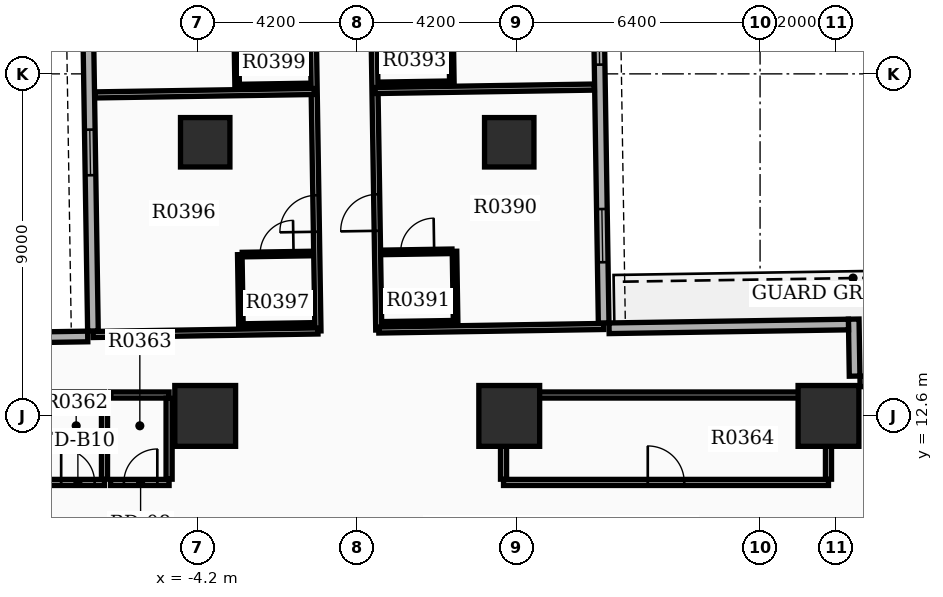
"""IFC4 building model, lengths in metres.
Left out: names, types, materials, properties, quantities, classifications, styles, units other than length and angle.
Written with IfcOpenShell. Run it as: python <this file> out.ifc"""

import sys

from ifc_helpers import new_model, si_unit, direction, frame, frame_2d, origin, origin_2d, place, context, subcontext, project, spatial, rectangle, extrude, element, fill, save


model = new_model("IFC4")
c1 = context("Model", 3, precision=1e-05, world=origin(), true_north=direction((0.0, 1.0)))
c2 = subcontext(c1, "Body", "Model", "MODEL_VIEW")
j1 = project(units=[si_unit("LENGTHUNIT", "METRE"), si_unit("PLANEANGLEUNIT", "RADIAN")], contexts=[c1])
p1 = place(None, origin())
s1 = spatial("IfcSite", under=j1, at=p1, CompositionType="ELEMENT")
p2 = place(p1, origin())
s2 = spatial("IfcBuilding", under=s1, at=p2, CompositionType="ELEMENT")
p3 = place(p2, frame((0.0, 0.0, 27.6)))
s3 = spatial("IfcBuildingStorey", under=s2, at=p3, CompositionType="ELEMENT", Elevation=27.6)
for number, where, z_axis, x_axis in (
    (1, (12.4, 12.6, 0.0), (0.0, 0.0, 1.0), (1.0, 0.0, 0.0)),
    (2, (4.0, 12.6, 0.0), (0.0, 0.0, 1.0), (1.0, 0.0, 0.0)),
    (3, (-4.0, 12.6, 0.0), (0.0, 0.0, 1.0), (1.0, 0.0, 0.0)),
):
    element("IfcColumn", number, at=place(p3, frame(where, z_axis=z_axis, x_axis=x_axis)), inside=s3, PredefinedType="COLUMN", context=c2, shape_type="SweptSolid", body=[
        extrude(rectangle(XDim=1.6, YDim=1.6, at=origin_2d()), origin(), (0.0, 0.0, 1.0), 3.9),
    ])
for number, where, z_axis, x_axis in (
    (4, (-4.0, 19.8, 0.0), (0.0, 0.0, 1.0), (1.0, 0.0, 0.0)),
    (5, (4.0, 19.8, 0.0), (0.0, 0.0, 1.0), (1.0, 0.0, 0.0)),
):
    element("IfcColumn", number, at=place(p3, frame(where, z_axis=z_axis, x_axis=x_axis)), inside=s3, PredefinedType="COLUMN", context=c2, shape_type="SweptSolid", body=[
        extrude(rectangle(XDim=1.3, YDim=1.3, at=origin_2d()), origin(), (0.0, 0.0, 1.0), 3.9),
    ])
p4 = place(p3, frame((6.485, 15.044, 0.0), z_axis=(0.0, 0.0, 1.0), x_axis=(-0.01571739401, 0.999876474133, 0.0)))
e6 = element("IfcWall", 6, at=p4, inside=s3, PredefinedType="STANDARD", context=c2, shape_type="SweptSolid", body=[
    extrude(rectangle(XDim=20.1, YDim=0.28, at=frame_2d((10.05, 0.0))), origin(), (0.0, 0.0, 1.0), 2.91),
])
p5 = place(p4, frame((1.6, 0.0, 0.8)))
e7 = element("IfcOpeningElement", 7, at=p5, cuts=e6, PredefinedType="OPENING", context=c2, shape_type="SweptSolid", body=[
    extrude(rectangle(XDim=1.4, YDim=1.6, at=frame_2d((0.7, 0.8))), frame((0.0, 0.15, 0.0), z_axis=(0.0, -1.0, 0.0), x_axis=(1.0, 0.0, 0.0)), (0.0, 0.0, 1.0), 0.3),
])
p6 = place(p4, frame((6.8, 0.0, 0.8)))
e8 = element("IfcOpeningElement", 8, at=p6, cuts=e6, PredefinedType="OPENING", context=c2, shape_type="SweptSolid", body=[
    extrude(rectangle(XDim=1.4, YDim=1.6, at=frame_2d((0.7, 0.8))), frame((0.0, 0.15, 0.0), z_axis=(0.0, -1.0, 0.0), x_axis=(1.0, 0.0, 0.0)), (0.0, 0.0, 1.0), 0.3),
])
p7 = place(p4, frame((10.0, 0.0, 0.8)))
e9 = element("IfcOpeningElement", 9, at=p7, cuts=e6, PredefinedType="OPENING", context=c2, shape_type="SweptSolid", body=[
    extrude(rectangle(XDim=1.4, YDim=1.6, at=frame_2d((0.7, 0.8))), frame((0.0, 0.15, 0.0), z_axis=(0.0, -1.0, 0.0), x_axis=(1.0, 0.0, 0.0)), (0.0, 0.0, 1.0), 0.3),
])
p8 = place(p4, frame((13.95, 0.0, 0.8)))
e10 = element("IfcOpeningElement", 10, at=p8, cuts=e6, PredefinedType="OPENING", context=c2, shape_type="SweptSolid", body=[
    extrude(rectangle(XDim=1.4, YDim=1.6, at=frame_2d((0.7, 0.8))), frame((0.0, 0.15, 0.0), z_axis=(0.0, -1.0, 0.0), x_axis=(1.0, 0.0, 0.0)), (0.0, 0.0, 1.0), 0.3),
])
p9 = place(p3, frame((-7.27, 34.93, 0.0), z_axis=(0.0, 0.0, 1.0), x_axis=(0.015705059908, -0.999876667941, 0.0)))
e11 = element("IfcWall", 11, at=p9, inside=s3, PredefinedType="STANDARD", context=c2, shape_type="SweptSolid", body=[
    extrude(rectangle(XDim=20.1, YDim=0.28, at=frame_2d((10.05, 0.0))), origin(), (0.0, 0.0, 1.0), 2.91),
])
p10 = place(p9, frame((1.6, 0.0, 0.8)))
e12 = element("IfcOpeningElement", 12, at=p10, cuts=e11, PredefinedType="OPENING", context=c2, shape_type="SweptSolid", body=[
    extrude(rectangle(XDim=1.4, YDim=1.6, at=frame_2d((0.7, 0.8))), frame((0.0, 0.15, 0.0), z_axis=(0.0, -1.0, 0.0), x_axis=(1.0, 0.0, 0.0)), (0.0, 0.0, 1.0), 0.3),
])
p11 = place(p9, frame((4.8, 0.0, 0.8)))
e13 = element("IfcOpeningElement", 13, at=p11, cuts=e11, PredefinedType="OPENING", context=c2, shape_type="SweptSolid", body=[
    extrude(rectangle(XDim=1.4, YDim=1.6, at=frame_2d((0.7, 0.8))), frame((0.0, 0.15, 0.0), z_axis=(0.0, -1.0, 0.0), x_axis=(1.0, 0.0, 0.0)), (0.0, 0.0, 1.0), 0.3),
])
p12 = place(p9, frame((8.0, 0.0, 0.8)))
e14 = element("IfcOpeningElement", 14, at=p12, cuts=e11, PredefinedType="OPENING", context=c2, shape_type="SweptSolid", body=[
    extrude(rectangle(XDim=1.4, YDim=1.6, at=frame_2d((0.7, 0.8))), frame((0.0, 0.15, 0.0), z_axis=(0.0, -1.0, 0.0), x_axis=(1.0, 0.0, 0.0)), (0.0, 0.0, 1.0), 0.3),
])
p13 = place(p9, frame((11.2, 0.0, 0.8)))
e15 = element("IfcOpeningElement", 15, at=p13, cuts=e11, PredefinedType="OPENING", context=c2, shape_type="SweptSolid", body=[
    extrude(rectangle(XDim=1.4, YDim=1.6, at=frame_2d((0.7, 0.8))), frame((0.0, 0.15, 0.0), z_axis=(0.0, -1.0, 0.0), x_axis=(1.0, 0.0, 0.0)), (0.0, 0.0, 1.0), 0.3),
])
p14 = place(p9, frame((14.799, 0.0, 0.85)))
e16 = element("IfcOpeningElement", 16, at=p14, cuts=e11, PredefinedType="OPENING", context=c2, shape_type="SweptSolid", body=[
    extrude(rectangle(XDim=1.2, YDim=1.6, at=frame_2d((0.6, 0.8))), frame((0.0, 0.15, 0.0), z_axis=(0.0, -1.0, 0.0), x_axis=(1.0, 0.0, 0.0)), (0.0, 0.0, 1.0), 0.3),
])
p15 = place(p3, frame((14.449, 13.529, 0.0), z_axis=(0.0, 0.0, 1.0), x_axis=(-0.999878147354, -0.015610587569, 0.0)))
e17 = element("IfcWall", 17, at=p15, inside=s3, PredefinedType="STANDARD", context=c2, shape_type="SweptSolid", body=[
    extrude(rectangle(XDim=1.22, YDim=0.28, at=frame_2d((0.61, 0.0))), origin(), (0.0, 0.0, 1.0), 2.91),
])
p16 = place(p3, frame((13.087, 13.647, 0.0), z_axis=(0.0, 0.0, 1.0), x_axis=(-0.015785793208, 0.999875396603, 0.0)))
e18 = element("IfcWall", 18, at=p16, inside=s3, PredefinedType="STANDARD", context=c2, shape_type="SweptSolid", body=[
    extrude(rectangle(XDim=1.5, YDim=0.28, at=frame_2d((0.75, 0.0))), origin(), (0.0, 0.0, 1.0), 2.91),
])
p17 = place(p3, frame((12.926, 15.005, 0.0), z_axis=(0.0, 0.0, 1.0), x_axis=(-0.999876823822, -0.015695132501, 0.0)))
e19 = element("IfcWall", 19, at=p17, inside=s3, PredefinedType="STANDARD", context=c2, shape_type="SweptSolid", body=[
    extrude(rectangle(XDim=6.3, YDim=0.28, at=frame_2d((3.15, 0.0))), origin(), (0.0, 0.0, 1.0), 2.91),
])
p18 = place(p3, frame((-13.391, 14.592, 0.0), z_axis=(0.0, 0.0, 1.0), x_axis=(0.999876833368, 0.015694524359, 0.0)))
e20 = element("IfcWall", 20, at=p18, inside=s3, PredefinedType="STANDARD", context=c2, shape_type="SweptSolid", body=[
    extrude(rectangle(XDim=6.3, YDim=0.28, at=frame_2d((3.15, 0.0))), origin(), (0.0, 0.0, 1.0), 2.91),
])
p19 = place(p3, frame((-8.14, 10.85, 0.0), z_axis=(0.0, 0.0, 1.0), x_axis=(1.0, 0.0, 0.0)))
e21 = element("IfcWall", 21, at=p19, inside=s3, PredefinedType="PARTITIONING", context=c2, shape_type="SweptSolid", body=[
    extrude(rectangle(XDim=1.49, YDim=0.16, at=frame_2d((0.745, 0.0))), origin(), (0.0, 0.0, 1.0), 2.9),
])
p20 = place(p19, frame((0.35, 0.0, 0.0)))
e22 = element("IfcOpeningElement", 22, at=p20, cuts=e21, PredefinedType="OPENING", context=c2, shape_type="SweptSolid", body=[
    extrude(rectangle(XDim=0.88, YDim=2.1, at=frame_2d((0.44, 1.05))), frame((0.0, 0.09, 0.0), z_axis=(0.0, -1.0, 0.0), x_axis=(1.0, 0.0, 0.0)), (0.0, 0.0, 1.0), 0.18),
])
p21 = place(p3, frame((-8.14, 13.15, 0.0), z_axis=(0.0, 0.0, 1.0), x_axis=(1.0, 0.0, 0.0)))
e23 = element("IfcWall", 23, at=p21, inside=s3, PredefinedType="PARTITIONING", context=c2, shape_type="SweptSolid", body=[
    extrude(rectangle(XDim=1.49, YDim=0.16, at=frame_2d((0.745, 0.0))), origin(), (0.0, 0.0, 1.0), 2.9),
])
p22 = place(p3, frame((-6.65, 10.935, 0.0), z_axis=(0.0, 0.0, 1.0), x_axis=(0.0, 1.0, 0.0)))
e24 = element("IfcWall", 24, at=p22, inside=s3, PredefinedType="PARTITIONING", context=c2, shape_type="SweptSolid", body=[
    extrude(rectangle(XDim=2.13, YDim=0.16, at=frame_2d((1.065, 0.0))), origin(), (0.0, 0.0, 1.0), 2.9),
])
p23 = place(p3, frame((-6.49, 10.85, 0.0), z_axis=(0.0, 0.0, 1.0), x_axis=(1.0, 0.0, 0.0)))
e25 = element("IfcWall", 25, at=p23, inside=s3, PredefinedType="PARTITIONING", context=c2, shape_type="SweptSolid", body=[
    extrude(rectangle(XDim=1.54, YDim=0.16, at=frame_2d((0.77, 0.0))), origin(), (0.0, 0.0, 1.0), 2.9),
])
p24 = place(p23, frame((0.35, 0.0, 0.0)))
e26 = element("IfcOpeningElement", 26, at=p24, cuts=e25, PredefinedType="OPENING", context=c2, shape_type="SweptSolid", body=[
    extrude(rectangle(XDim=0.88, YDim=2.15, at=frame_2d((0.44, 1.075))), frame((0.0, 0.09, 0.0), z_axis=(0.0, -1.0, 0.0), x_axis=(1.0, 0.0, 0.0)), (0.0, 0.0, 1.0), 0.18),
])
p25 = place(p3, frame((-6.49, 13.15, 0.0), z_axis=(0.0, 0.0, 1.0), x_axis=(1.0, 0.0, 0.0)))
e27 = element("IfcWall", 27, at=p25, inside=s3, PredefinedType="PARTITIONING", context=c2, shape_type="SweptSolid", body=[
    extrude(rectangle(XDim=1.54, YDim=0.16, at=frame_2d((0.77, 0.0))), origin(), (0.0, 0.0, 1.0), 2.9),
])
p26 = place(p3, frame((-4.95, 10.935, 0.0), z_axis=(0.0, 0.0, 1.0), x_axis=(0.0, 1.0, 0.0)))
e28 = element("IfcWall", 28, at=p26, inside=s3, PredefinedType="PARTITIONING", context=c2, shape_type="SweptSolid", body=[
    extrude(rectangle(XDim=2.13, YDim=0.16, at=frame_2d((1.065, 0.0))), origin(), (0.0, 0.0, 1.0), 2.9),
])
p27 = place(p3, frame((3.85, 10.85, 0.0), z_axis=(0.0, 0.0, 1.0), x_axis=(1.0, 0.0, 0.0)))
e29 = element("IfcWall", 29, at=p27, inside=s3, PredefinedType="PARTITIONING", context=c2, shape_type="SweptSolid", body=[
    extrude(rectangle(XDim=8.55, YDim=0.16, at=frame_2d((4.275, 0.0))), origin(), (0.0, 0.0, 1.0), 2.9),
])
p28 = place(p27, frame((3.795, 0.0, 0.0)))
e30 = element("IfcOpeningElement", 30, at=p28, cuts=e29, PredefinedType="OPENING", context=c2, shape_type="SweptSolid", body=[
    extrude(rectangle(XDim=0.96, YDim=2.15, at=frame_2d((0.48, 1.075))), frame((0.0, 0.09, 0.0), z_axis=(0.0, -1.0, 0.0), x_axis=(1.0, 0.0, 0.0)), (0.0, 0.0, 1.0), 0.18),
])
p29 = place(p3, frame((3.85, 13.15, 0.0), z_axis=(0.0, 0.0, 1.0), x_axis=(1.0, 0.0, 0.0)))
e31 = element("IfcWall", 31, at=p29, inside=s3, PredefinedType="PARTITIONING", context=c2, shape_type="SweptSolid", body=[
    extrude(rectangle(XDim=8.55, YDim=0.16, at=frame_2d((4.275, 0.0))), origin(), (0.0, 0.0, 1.0), 2.9),
])
for number, where, z_axis, x_axis in (
    (32, (3.85, 10.935, 0.0), (0.0, 0.0, 1.0), (0.0, 1.0, 0.0)),
    (33, (12.4, 10.935, 0.0), (0.0, 0.0, 1.0), (0.0, 1.0, 0.0)),
):
    element("IfcWall", number, at=place(p3, frame(where, z_axis=z_axis, x_axis=x_axis)), inside=s3, PredefinedType="PARTITIONING", context=c2, shape_type="SweptSolid", body=[
        extrude(rectangle(XDim=2.13, YDim=0.16, at=frame_2d((1.065, 0.0))), origin(), (0.0, 0.0, 1.0), 2.9),
    ])
p30 = place(p3, frame((0.567, 14.861, 0.0), z_axis=(0.0, 0.0, 1.0), x_axis=(-0.015713797103, 0.999876530668, 0.0)))
e34 = element("IfcWall", 34, at=p30, inside=s3, PredefinedType="PARTITIONING", context=c2, shape_type="SweptSolid", body=[
    extrude(rectangle(XDim=20.182, YDim=0.16, at=frame_2d((10.091, 0.0))), origin(), (0.0, 0.0, 1.0), 2.9),
])
p31 = place(p30, frame((2.61, 0.0, 0.0)))
e35 = element("IfcOpeningElement", 35, at=p31, cuts=e34, PredefinedType="OPENING", context=c2, shape_type="SweptSolid", body=[
    extrude(rectangle(XDim=0.96, YDim=2.15, at=frame_2d((0.48, 1.075))), frame((0.0, 0.09, 0.0), z_axis=(0.0, -1.0, 0.0), x_axis=(1.0, 0.0, 0.0)), (0.0, 0.0, 1.0), 0.18),
])
p32 = place(p30, frame((8.994, 0.0, 0.0)))
e36 = element("IfcOpeningElement", 36, at=p32, cuts=e34, PredefinedType="OPENING", context=c2, shape_type="SweptSolid", body=[
    extrude(rectangle(XDim=0.96, YDim=2.15, at=frame_2d((0.48, 1.075))), frame((0.0, 0.09, 0.0), z_axis=(0.0, -1.0, 0.0), x_axis=(1.0, 0.0, 0.0)), (0.0, 0.0, 1.0), 0.18),
])
p33 = place(p30, frame((18.93, 0.0, 0.0)))
e37 = element("IfcOpeningElement", 37, at=p33, cuts=e34, PredefinedType="OPENING", context=c2, shape_type="SweptSolid", body=[
    extrude(rectangle(XDim=0.96, YDim=2.15, at=frame_2d((0.48, 1.075))), frame((0.0, 0.09, 0.0), z_axis=(0.0, -1.0, 0.0), x_axis=(1.0, 0.0, 0.0)), (0.0, 0.0, 1.0), 0.18),
])
p34 = place(p3, frame((0.567, 14.861, 0.0), z_axis=(0.0, 0.0, 1.0), x_axis=(0.999876548847, 0.015712640343, 0.0)))
e38 = element("IfcWall", 38, at=p34, inside=s3, PredefinedType="PARTITIONING", context=c2, shape_type="SweptSolid", body=[
    extrude(rectangle(XDim=5.92, YDim=0.16, at=frame_2d((2.96, 0.0))), origin(), (0.0, 0.0, 1.0), 2.9),
])
p35 = place(p3, frame((0.468, 21.162, 0.0), z_axis=(0.0, 0.0, 1.0), x_axis=(0.999876865599, 0.015692470796, 0.0)))
e39 = element("IfcWall", 39, at=p35, inside=s3, PredefinedType="PARTITIONING", context=c2, shape_type="SweptSolid", body=[
    extrude(rectangle(XDim=5.772, YDim=0.16, at=frame_2d((2.886, 0.0))), origin(), (0.0, 0.0, 1.0), 2.9),
])
p36 = place(p3, frame((0.675, 16.903, 0.0), z_axis=(0.0, 0.0, 1.0), x_axis=(0.999874722342, 0.015828443418, 0.0)))
e40 = element("IfcWall", 40, at=p36, inside=s3, PredefinedType="PARTITIONING", context=c2, shape_type="SweptSolid", body=[
    extrude(rectangle(XDim=1.82, YDim=0.12, at=frame_2d((0.91, 0.0))), origin(), (0.0, 0.0, 1.0), 2.9),
])
p37 = place(p36, frame((0.47, 0.0, 0.0)))
e41 = element("IfcOpeningElement", 41, at=p37, cuts=e40, PredefinedType="OPENING", context=c2, shape_type="SweptSolid", body=[
    extrude(rectangle(XDim=0.88, YDim=2.1, at=frame_2d((0.44, 1.05))), frame((0.0, 0.07, 0.0), z_axis=(0.0, -1.0, 0.0), x_axis=(1.0, 0.0, 0.0)), (0.0, 0.0, 1.0), 0.14),
])
p38 = place(p3, frame((0.704, 15.023, 0.0), z_axis=(0.0, 0.0, 1.0), x_axis=(0.999876836305, 0.015694337248, 0.0)))
e42 = element("IfcWall", 42, at=p38, inside=s3, PredefinedType="PARTITIONING", context=c2, shape_type="SweptSolid", body=[
    extrude(rectangle(XDim=1.82, YDim=0.12, at=frame_2d((0.91, 0.0))), origin(), (0.0, 0.0, 1.0), 2.9),
])
p39 = place(p3, frame((2.589, 15.052, 0.0), z_axis=(0.0, 0.0, 1.0), x_axis=(-0.01571234584, 0.999876553475, 0.0)))
e43 = element("IfcWall", 43, at=p39, inside=s3, PredefinedType="PARTITIONING", context=c2, shape_type="SweptSolid", body=[
    extrude(rectangle(XDim=1.88, YDim=0.12, at=frame_2d((0.94, 0.0))), origin(), (0.0, 0.0, 1.0), 2.9),
])
p40 = place(p3, frame((0.605, 21.324, 0.0), z_axis=(0.0, 0.0, 1.0), x_axis=(0.999876836305, 0.015694337248, 0.0)))
e44 = element("IfcWall", 44, at=p40, inside=s3, PredefinedType="PARTITIONING", context=c2, shape_type="SweptSolid", body=[
    extrude(rectangle(XDim=1.82, YDim=0.12, at=frame_2d((0.91, 0.0))), origin(), (0.0, 0.0, 1.0), 2.9),
])
p41 = place(p3, frame((2.49, 21.354, 0.0), z_axis=(0.0, 0.0, 1.0), x_axis=(-0.015714386166, 0.99987652141, 0.0)))
e45 = element("IfcWall", 45, at=p41, inside=s3, PredefinedType="PARTITIONING", context=c2, shape_type="SweptSolid", body=[
    extrude(rectangle(XDim=1.88, YDim=0.12, at=frame_2d((0.94, 0.0))), origin(), (0.0, 0.0, 1.0), 2.9),
])
p42 = place(p3, frame((-1.033, 14.836, 0.0), z_axis=(0.0, 0.0, 1.0), x_axis=(-0.015701893165, 0.999876717676, 0.0)))
e46 = element("IfcWall", 46, at=p42, inside=s3, PredefinedType="PARTITIONING", context=c2, shape_type="SweptSolid", body=[
    extrude(rectangle(XDim=20.182, YDim=0.16, at=frame_2d((10.091, 0.0))), origin(), (0.0, 0.0, 1.0), 2.9),
])
p43 = place(p42, frame((2.61, 0.0, 0.0)))
e47 = element("IfcOpeningElement", 47, at=p43, cuts=e46, PredefinedType="OPENING", context=c2, shape_type="SweptSolid", body=[
    extrude(rectangle(XDim=0.96, YDim=2.15, at=frame_2d((0.48, 1.075))), frame((0.0, 0.09, 0.0), z_axis=(0.0, -1.0, 0.0), x_axis=(1.0, 0.0, 0.0)), (0.0, 0.0, 1.0), 0.18),
])
p44 = place(p42, frame((8.994, 0.0, 0.0)))
e48 = element("IfcOpeningElement", 48, at=p44, cuts=e46, PredefinedType="OPENING", context=c2, shape_type="SweptSolid", body=[
    extrude(rectangle(XDim=0.96, YDim=2.15, at=frame_2d((0.48, 1.075))), frame((0.0, 0.09, 0.0), z_axis=(0.0, -1.0, 0.0), x_axis=(1.0, 0.0, 0.0)), (0.0, 0.0, 1.0), 0.18),
])
p45 = place(p42, frame((18.93, 0.0, 0.0)))
e49 = element("IfcOpeningElement", 49, at=p45, cuts=e46, PredefinedType="OPENING", context=c2, shape_type="SweptSolid", body=[
    extrude(rectangle(XDim=0.96, YDim=2.15, at=frame_2d((0.48, 1.075))), frame((0.0, 0.09, 0.0), z_axis=(0.0, -1.0, 0.0), x_axis=(1.0, 0.0, 0.0)), (0.0, 0.0, 1.0), 0.18),
])
p46 = place(p3, frame((-1.033, 14.836, 0.0), z_axis=(0.0, 0.0, 1.0), x_axis=(-0.999876548847, -0.015712640343, 0.0)))
e50 = element("IfcWall", 50, at=p46, inside=s3, PredefinedType="PARTITIONING", context=c2, shape_type="SweptSolid", body=[
    extrude(rectangle(XDim=5.92, YDim=0.16, at=frame_2d((2.96, 0.0))), origin(), (0.0, 0.0, 1.0), 2.9),
])
p47 = place(p3, frame((-1.132, 21.137, 0.0), z_axis=(0.0, 0.0, 1.0), x_axis=(-0.999876865599, -0.015692470796, 0.0)))
e51 = element("IfcWall", 51, at=p47, inside=s3, PredefinedType="PARTITIONING", context=c2, shape_type="SweptSolid", body=[
    extrude(rectangle(XDim=5.772, YDim=0.16, at=frame_2d((2.886, 0.0))), origin(), (0.0, 0.0, 1.0), 2.9),
])
p48 = place(p3, frame((-3.025, 16.844, 0.0), z_axis=(0.0, 0.0, 1.0), x_axis=(0.999874722342, 0.015828443418, 0.0)))
e52 = element("IfcWall", 52, at=p48, inside=s3, PredefinedType="PARTITIONING", context=c2, shape_type="SweptSolid", body=[
    extrude(rectangle(XDim=1.82, YDim=0.12, at=frame_2d((0.91, 0.0))), origin(), (0.0, 0.0, 1.0), 2.9),
])
p49 = place(p48, frame((0.47, 0.0, 0.0)))
e53 = element("IfcOpeningElement", 53, at=p49, cuts=e52, PredefinedType="OPENING", context=c2, shape_type="SweptSolid", body=[
    extrude(rectangle(XDim=0.88, YDim=2.1, at=frame_2d((0.44, 1.05))), frame((0.0, 0.07, 0.0), z_axis=(0.0, -1.0, 0.0), x_axis=(1.0, 0.0, 0.0)), (0.0, 0.0, 1.0), 0.14),
])
p50 = place(p3, frame((-2.995, 14.965, 0.0), z_axis=(0.0, 0.0, 1.0), x_axis=(0.999876803258, 0.015696442504, 0.0)))
e54 = element("IfcWall", 54, at=p50, inside=s3, PredefinedType="PARTITIONING", context=c2, shape_type="SweptSolid", body=[
    extrude(rectangle(XDim=1.82, YDim=0.12, at=frame_2d((0.91, 0.0))), origin(), (0.0, 0.0, 1.0), 2.9),
])
p51 = place(p3, frame((-3.06, 14.964, 0.0), z_axis=(0.0, 0.0, 1.0), x_axis=(-0.015714386166, 0.99987652141, 0.0)))
e55 = element("IfcWall", 55, at=p51, inside=s3, PredefinedType="PARTITIONING", context=c2, shape_type="SweptSolid", body=[
    extrude(rectangle(XDim=1.88, YDim=0.12, at=frame_2d((0.94, 0.0))), origin(), (0.0, 0.0, 1.0), 2.9),
])
p52 = place(p3, frame((-3.094, 21.266, 0.0), z_axis=(0.0, 0.0, 1.0), x_axis=(0.999876836305, 0.015694337248, 0.0)))
e56 = element("IfcWall", 56, at=p52, inside=s3, PredefinedType="PARTITIONING", context=c2, shape_type="SweptSolid", body=[
    extrude(rectangle(XDim=1.82, YDim=0.12, at=frame_2d((0.91, 0.0))), origin(), (0.0, 0.0, 1.0), 2.9),
])
p53 = place(p3, frame((-3.159, 21.265, 0.0), z_axis=(0.0, 0.0, 1.0), x_axis=(-0.01571234584, 0.999876553475, 0.0)))
e57 = element("IfcWall", 57, at=p53, inside=s3, PredefinedType="PARTITIONING", context=c2, shape_type="SweptSolid", body=[
    extrude(rectangle(XDim=1.88, YDim=0.12, at=frame_2d((0.94, 0.0))), origin(), (0.0, 0.0, 1.0), 2.9),
])
p54 = place(p5, origin())
e58 = element("IfcWindow", 58, at=p54, inside=s3, PartitioningType="SINGLE_PANEL", PredefinedType="WINDOW", context=c2, shape_type="SweptSolid", body=[
    extrude(rectangle(XDim=1.4, YDim=1.6, at=frame_2d((0.7, 0.8))), frame((0.0, 0.03, 0.0), z_axis=(0.0, -1.0, 0.0), x_axis=(1.0, 0.0, 0.0)), (0.0, 0.0, 1.0), 0.06),
])
fill(e7, e58)
p55 = place(p6, origin())
e59 = element("IfcWindow", 59, at=p55, inside=s3, PartitioningType="SINGLE_PANEL", PredefinedType="WINDOW", context=c2, shape_type="SweptSolid", body=[
    extrude(rectangle(XDim=1.4, YDim=1.6, at=frame_2d((0.7, 0.8))), frame((0.0, 0.03, 0.0), z_axis=(0.0, -1.0, 0.0), x_axis=(1.0, 0.0, 0.0)), (0.0, 0.0, 1.0), 0.06),
])
fill(e8, e59)
p56 = place(p14, origin())
e60 = element("IfcWindow", 60, at=p56, inside=s3, PartitioningType="SINGLE_PANEL", PredefinedType="WINDOW", context=c2, shape_type="SweptSolid", body=[
    extrude(rectangle(XDim=1.2, YDim=1.6, at=frame_2d((0.6, 0.8))), frame((0.0, 0.03, 0.0), z_axis=(0.0, -1.0, 0.0), x_axis=(1.0, 0.0, 0.0)), (0.0, 0.0, 1.0), 0.06),
])
fill(e16, e60)
p57 = place(p20, origin())
e61 = element("IfcDoor", 61, at=p57, inside=s3, OperationType="SINGLE_SWING_LEFT", PredefinedType="DOOR", context=c2, shape_type="SweptSolid", body=[
    extrude(rectangle(XDim=0.88, YDim=2.1, at=frame_2d((0.44, 1.05))), frame((0.0, 0.025, 0.0), z_axis=(0.0, -1.0, 0.0), x_axis=(1.0, 0.0, 0.0)), (0.0, 0.0, 1.0), 0.05),
])
fill(e22, e61)
p58 = place(p24, origin())
e62 = element("IfcDoor", 62, at=p58, inside=s3, OperationType="SINGLE_SWING_RIGHT", PredefinedType="DOOR", context=c2, shape_type="SweptSolid", body=[
    extrude(rectangle(XDim=0.88, YDim=2.15, at=frame_2d((0.44, 1.075))), frame((0.0, 0.025, 0.0), z_axis=(0.0, -1.0, 0.0), x_axis=(1.0, 0.0, 0.0)), (0.0, 0.0, 1.0), 0.05),
])
fill(e26, e62)
p59 = place(p28, origin())
e63 = element("IfcDoor", 63, at=p59, inside=s3, OperationType="SINGLE_SWING_LEFT", PredefinedType="DOOR", context=c2, shape_type="SweptSolid", body=[
    extrude(rectangle(XDim=0.96, YDim=2.15, at=frame_2d((0.48, 1.075))), frame((0.0, 0.025, 0.0), z_axis=(0.0, -1.0, 0.0), x_axis=(1.0, 0.0, 0.0)), (0.0, 0.0, 1.0), 0.05),
])
fill(e30, e63)
p60 = place(p31, origin())
e64 = element("IfcDoor", 64, at=p60, inside=s3, OperationType="SINGLE_SWING_LEFT", PredefinedType="DOOR", context=c2, shape_type="SweptSolid", body=[
    extrude(rectangle(XDim=0.96, YDim=2.15, at=frame_2d((0.48, 1.075))), frame((0.0, 0.025, 0.0), z_axis=(0.0, -1.0, 0.0), x_axis=(1.0, 0.0, 0.0)), (0.0, 0.0, 1.0), 0.05),
])
fill(e35, e64)
p61 = place(p37, origin())
e65 = element("IfcDoor", 65, at=p61, inside=s3, OperationType="SINGLE_SWING_RIGHT", PredefinedType="DOOR", context=c2, shape_type="SweptSolid", body=[
    extrude(rectangle(XDim=0.88, YDim=2.1, at=frame_2d((0.44, 1.05))), frame((0.0, 0.025, 0.0), z_axis=(0.0, -1.0, 0.0), x_axis=(1.0, 0.0, 0.0)), (0.0, 0.0, 1.0), 0.05),
])
fill(e41, e65)
p62 = place(p43, origin())
e66 = element("IfcDoor", 66, at=p62, inside=s3, OperationType="SINGLE_SWING_LEFT", PredefinedType="DOOR", context=c2, shape_type="SweptSolid", body=[
    extrude(rectangle(XDim=0.96, YDim=2.15, at=frame_2d((0.48, 1.075))), frame((0.0, 0.025, 0.0), z_axis=(0.0, -1.0, 0.0), x_axis=(1.0, 0.0, 0.0)), (0.0, 0.0, 1.0), 0.05),
])
fill(e47, e66)
p63 = place(p49, origin())
e67 = element("IfcDoor", 67, at=p63, inside=s3, OperationType="SINGLE_SWING_RIGHT", PredefinedType="DOOR", context=c2, shape_type="SweptSolid", body=[
    extrude(rectangle(XDim=0.88, YDim=2.1, at=frame_2d((0.44, 1.05))), frame((0.0, 0.025, 0.0), z_axis=(0.0, -1.0, 0.0), x_axis=(1.0, 0.0, 0.0)), (0.0, 0.0, 1.0), 0.05),
])
fill(e53, e67)
save(model, sys.argv[1])
